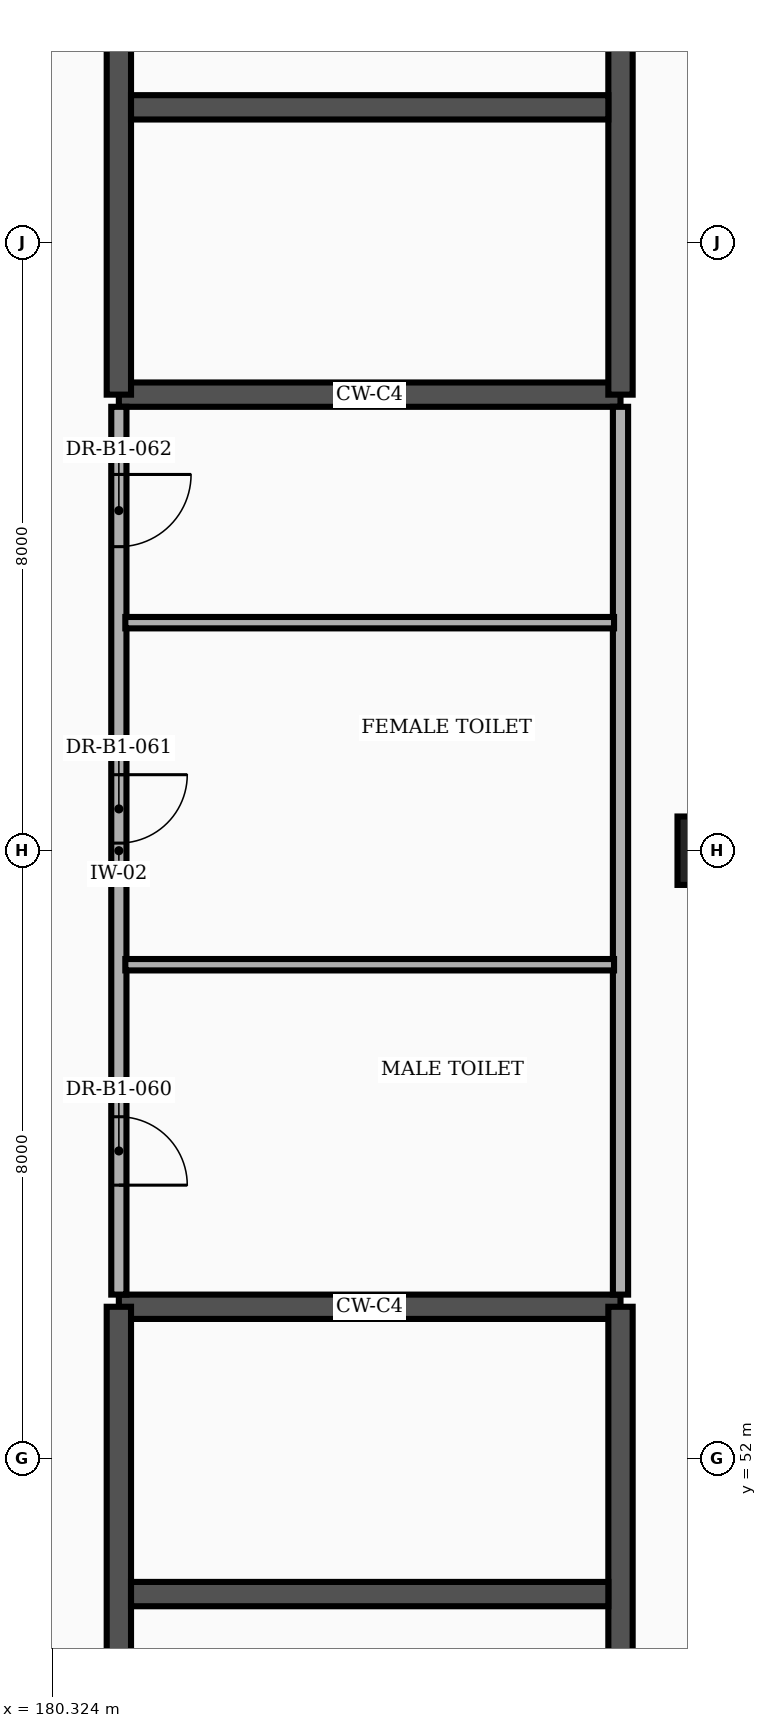
"""IFC4 building model, lengths in metres.
Left out: names, types, materials, properties, quantities, classifications, styles, units other than length and angle.
Written with IfcOpenShell. Run it as: python <this file> out.ifc"""

import sys

from ifc_helpers import new_model, si_unit, direction, frame, frame_2d, origin, origin_2d, place, context, subcontext, project, spatial, rectangle, extrude, element, fill, save


model = new_model("IFC4")
c1 = context("Model", 3, precision=1e-05, world=origin(), true_north=direction((0.0, 1.0)))
c2 = subcontext(c1, "Body", "Model", "MODEL_VIEW")
j1 = project(units=[si_unit("LENGTHUNIT", "METRE"), si_unit("PLANEANGLEUNIT", "RADIAN")], contexts=[c1])
p1 = place(None, origin())
s1 = spatial("IfcSite", under=j1, at=p1, CompositionType="ELEMENT")
p2 = place(p1, origin())
s2 = spatial("IfcBuilding", under=s1, at=p2, CompositionType="ELEMENT")
p3 = place(p2, frame((0.0, 0.0, -4.5)))
s3 = spatial("IfcBuildingStorey", under=s2, at=p3, CompositionType="ELEMENT", Elevation=-4.5)
p4 = place(p3, frame((189.0, 60.0, -0.45), z_axis=(0.0, 0.0, 1.0), x_axis=(1.0, 0.0, 0.0)))
e1 = element("IfcColumn", 1, at=p4, inside=s3, PredefinedType="COLUMN", context=c2, shape_type="SweptSolid", body=[
    extrude(rectangle(XDim=0.9, YDim=0.9, at=origin_2d()), origin(), (0.0, 0.0, 1.0), 4.95),
])
p5 = place(p3, frame((181.2, 54.0, 0.0), z_axis=(0.0, 0.0, 1.0), x_axis=(1.0, 0.0, 0.0)))
e2 = element("IfcWall", 2, at=p5, inside=s3, PredefinedType="SHEAR", context=c2, shape_type="SweptSolid", body=[
    extrude(rectangle(XDim=6.6, YDim=0.32, at=frame_2d((3.3, 0.0))), origin(), (0.0, 0.0, 1.0), 4.24),
])
p6 = place(p3, frame((181.2, 39.4, 0.0), z_axis=(0.0, 0.0, 1.0), x_axis=(0.0, 1.0, 0.0)))
e3 = element("IfcWall", 3, at=p6, inside=s3, PredefinedType="SHEAR", context=c2, shape_type="SweptSolid", body=[
    extrude(rectangle(XDim=14.6, YDim=0.32, at=frame_2d((7.3, 0.0))), origin(), (0.0, 0.0, 1.0), 4.24),
])
p7 = place(p6, frame((0.55, 0.0, 0.0)))
e4 = element("IfcOpeningElement", 4, at=p7, cuts=e3, PredefinedType="OPENING", context=c2, shape_type="SweptSolid", body=[
    extrude(rectangle(XDim=2.4, YDim=2.25, at=frame_2d((1.2, 1.125))), frame((0.0, 0.172, 0.0), z_axis=(0.0, -1.0, 0.0), x_axis=(1.0, 0.0, 0.0)), (0.0, 0.0, 1.0), 0.344),
])
p8 = place(p3, frame((187.8, 39.4, 0.0), z_axis=(0.0, 0.0, 1.0), x_axis=(0.0, 1.0, 0.0)))
e5 = element("IfcWall", 5, at=p8, inside=s3, PredefinedType="SHEAR", context=c2, shape_type="SweptSolid", body=[
    extrude(rectangle(XDim=14.6, YDim=0.32, at=frame_2d((7.3, 0.0))), origin(), (0.0, 0.0, 1.0), 4.24),
])
p9 = place(p3, frame((181.36, 50.22, 0.0), z_axis=(0.0, 0.0, 1.0), x_axis=(1.0, 0.0, 0.0)))
e6 = element("IfcWall", 6, at=p9, inside=s3, PredefinedType="SHEAR", context=c2, shape_type="SweptSolid", body=[
    extrude(rectangle(XDim=6.28, YDim=0.32, at=frame_2d((3.14, 0.0))), origin(), (0.0, 0.0, 1.0), 4.24),
])
p10 = place(p3, frame((181.2, 66.0, 0.0), z_axis=(0.0, 0.0, 1.0), x_axis=(1.0, 0.0, 0.0)))
e7 = element("IfcWall", 7, at=p10, inside=s3, PredefinedType="SHEAR", context=c2, shape_type="SweptSolid", body=[
    extrude(rectangle(XDim=6.6, YDim=0.32, at=frame_2d((3.3, 0.0))), origin(), (0.0, 0.0, 1.0), 4.24),
])
p11 = place(p3, frame((181.2, 66.0, 0.0), z_axis=(0.0, 0.0, 1.0), x_axis=(0.0, 1.0, 0.0)))
e8 = element("IfcWall", 8, at=p11, inside=s3, PredefinedType="SHEAR", context=c2, shape_type="SweptSolid", body=[
    extrude(rectangle(XDim=14.6, YDim=0.32, at=frame_2d((7.3, 0.0))), origin(), (0.0, 0.0, 1.0), 4.24),
])
p12 = place(p11, frame((11.65, 0.0, 0.0)))
e9 = element("IfcOpeningElement", 9, at=p12, cuts=e8, PredefinedType="OPENING", context=c2, shape_type="SweptSolid", body=[
    extrude(rectangle(XDim=2.4, YDim=2.25, at=frame_2d((1.2, 1.125))), frame((0.0, 0.172, 0.0), z_axis=(0.0, -1.0, 0.0), x_axis=(1.0, 0.0, 0.0)), (0.0, 0.0, 1.0), 0.344),
])
p13 = place(p3, frame((187.8, 66.0, 0.0), z_axis=(0.0, 0.0, 1.0), x_axis=(0.0, 1.0, 0.0)))
e10 = element("IfcWall", 10, at=p13, inside=s3, PredefinedType="SHEAR", context=c2, shape_type="SweptSolid", body=[
    extrude(rectangle(XDim=14.6, YDim=0.32, at=frame_2d((7.3, 0.0))), origin(), (0.0, 0.0, 1.0), 4.24),
])
p14 = place(p3, frame((181.36, 69.78, 0.0), z_axis=(0.0, 0.0, 1.0), x_axis=(1.0, 0.0, 0.0)))
e11 = element("IfcWall", 11, at=p14, inside=s3, PredefinedType="SHEAR", context=c2, shape_type="SweptSolid", body=[
    extrude(rectangle(XDim=6.28, YDim=0.32, at=frame_2d((3.14, 0.0))), origin(), (0.0, 0.0, 1.0), 4.24),
])
p15 = place(p3, frame((187.8, 54.16, 0.0), z_axis=(0.0, 0.0, 1.0), x_axis=(0.0, 1.0, 0.0)))
e12 = element("IfcWall", 12, at=p15, inside=s3, PredefinedType="PARTITIONING", context=c2, shape_type="SweptSolid", body=[
    extrude(rectangle(XDim=11.68, YDim=0.2, at=frame_2d((5.84, 0.0))), origin(), (0.0, 0.0, 1.0), 4.24),
])
p16 = place(p3, frame((181.2, 54.16, 0.0), z_axis=(0.0, 0.0, 1.0), x_axis=(0.0, 1.0, 0.0)))
e13 = element("IfcWall", 13, at=p16, inside=s3, PredefinedType="PARTITIONING", context=c2, shape_type="SweptSolid", body=[
    extrude(rectangle(XDim=11.68, YDim=0.2, at=frame_2d((5.84, 0.0))), origin(), (0.0, 0.0, 1.0), 4.24),
])
p17 = place(p16, frame((1.44, 0.0, 0.0)))
e14 = element("IfcOpeningElement", 14, at=p17, cuts=e13, PredefinedType="OPENING", context=c2, shape_type="SweptSolid", body=[
    extrude(rectangle(XDim=0.9, YDim=2.1, at=frame_2d((0.45, 1.05))), frame((0.0, 0.112, 0.0), z_axis=(0.0, -1.0, 0.0), x_axis=(1.0, 0.0, 0.0)), (0.0, 0.0, 1.0), 0.224),
])
p18 = place(p16, frame((5.94, 0.0, 0.0)))
e15 = element("IfcOpeningElement", 15, at=p18, cuts=e13, PredefinedType="OPENING", context=c2, shape_type="SweptSolid", body=[
    extrude(rectangle(XDim=0.9, YDim=2.1, at=frame_2d((0.45, 1.05))), frame((0.0, 0.112, 0.0), z_axis=(0.0, -1.0, 0.0), x_axis=(1.0, 0.0, 0.0)), (0.0, 0.0, 1.0), 0.224),
])
p19 = place(p16, frame((9.84, 0.0, 0.0)))
e16 = element("IfcOpeningElement", 16, at=p19, cuts=e13, PredefinedType="OPENING", context=c2, shape_type="SweptSolid", body=[
    extrude(rectangle(XDim=0.95, YDim=2.1, at=frame_2d((0.475, 1.05))), frame((0.0, 0.112, 0.0), z_axis=(0.0, -1.0, 0.0), x_axis=(1.0, 0.0, 0.0)), (0.0, 0.0, 1.0), 0.224),
])
for number, where, z_axis, x_axis in (
    (17, (181.285, 58.5, 0.0), (0.0, 0.0, 1.0), (1.0, 0.0, 0.0)),
    (18, (181.285, 63.0, 0.0), (0.0, 0.0, 1.0), (1.0, 0.0, 0.0)),
):
    element("IfcWall", number, at=place(p3, frame(where, z_axis=z_axis, x_axis=x_axis)), inside=s3, PredefinedType="PARTITIONING", context=c2, shape_type="SweptSolid", body=[
        extrude(rectangle(XDim=6.43, YDim=0.15, at=frame_2d((3.215, 0.0))), origin(), (0.0, 0.0, 1.0), 4.24),
    ])
p20 = place(p17, frame((0.9, 0.0, 0.0), z_axis=(0.0, 0.0, 1.0), x_axis=(-1.0, 0.0, 0.0)))
e19 = element("IfcDoor", 19, at=p20, inside=s3, OperationType="SINGLE_SWING_RIGHT", PredefinedType="DOOR", context=c2, shape_type="SweptSolid", body=[
    extrude(rectangle(XDim=0.9, YDim=2.1, at=frame_2d((0.45, 1.05))), frame((0.0, 0.025, 0.0), z_axis=(0.0, -1.0, 0.0), x_axis=(1.0, 0.0, 0.0)), (0.0, 0.0, 1.0), 0.05),
])
fill(e14, e19)
p21 = place(p18, frame((0.9, 0.0, 0.0), z_axis=(0.0, 0.0, 1.0), x_axis=(-1.0, 0.0, 0.0)))
e20 = element("IfcDoor", 20, at=p21, inside=s3, OperationType="SINGLE_SWING_LEFT", PredefinedType="DOOR", context=c2, shape_type="SweptSolid", body=[
    extrude(rectangle(XDim=0.9, YDim=2.1, at=frame_2d((0.45, 1.05))), frame((0.0, 0.025, 0.0), z_axis=(0.0, -1.0, 0.0), x_axis=(1.0, 0.0, 0.0)), (0.0, 0.0, 1.0), 0.05),
])
fill(e15, e20)
p22 = place(p19, frame((0.95, 0.0, 0.0), z_axis=(0.0, 0.0, 1.0), x_axis=(-1.0, 0.0, 0.0)))
e21 = element("IfcDoor", 21, at=p22, inside=s3, OperationType="SINGLE_SWING_LEFT", PredefinedType="DOOR", context=c2, shape_type="SweptSolid", body=[
    extrude(rectangle(XDim=0.95, YDim=2.1, at=frame_2d((0.475, 1.05))), frame((0.0, 0.025, 0.0), z_axis=(0.0, -1.0, 0.0), x_axis=(1.0, 0.0, 0.0)), (0.0, 0.0, 1.0), 0.05),
])
fill(e16, e21)
save(model, sys.argv[1])
